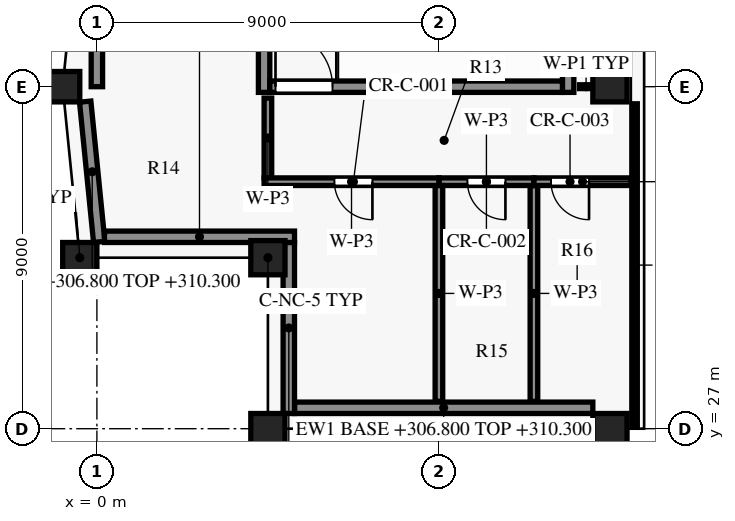
"""IFC4 building model, lengths in metres.
Left out: names, types, materials, properties, quantities, classifications, styles, units other than length and angle.
Written with IfcOpenShell. Run it as: python <this file> out.ifc"""

import sys

from ifc_helpers import new_model, si_unit, direction, frame, frame_2d, origin, origin_2d, place, context, subcontext, project, spatial, rectangle, extrude, element, fill, save


model = new_model("IFC4")
c1 = context("Model", 3, precision=1e-05, world=origin(), true_north=direction((0.0, 1.0)))
c2 = subcontext(c1, "Body", "Model", "MODEL_VIEW")
j1 = project(units=[si_unit("LENGTHUNIT", "METRE"), si_unit("PLANEANGLEUNIT", "RADIAN")], contexts=[c1])
p1 = place(None, origin())
s1 = spatial("IfcSite", under=j1, at=p1, CompositionType="ELEMENT")
p2 = place(p1, origin())
s2 = spatial("IfcBuilding", under=s1, at=p2, CompositionType="ELEMENT")
p3 = place(p2, frame((0.0, 0.0, 306.8)))
s3 = spatial("IfcBuildingStorey", under=s2, at=p3, CompositionType="ELEMENT", Elevation=306.8)
for number, where, z_axis, x_axis in (
    (1, (4.5, 27.0, 0.0), (0.0, 0.0, 1.0), (1.0, 0.0, 0.0)),
    (2, (13.5, 27.0, 0.0), (0.0, 0.0, 1.0), (1.0, 0.0, 0.0)),
    (3, (13.5, 36.0, 0.0), (0.0, 0.0, 1.0), (1.0, 0.0, 0.0)),
    (4, (-0.9, 36.0, 0.0), (0.0, 0.0, 1.0), (0.0, -1.0, 0.0)),
    (5, (-0.45, 31.5, 0.0), (0.0, 0.0, 1.0), (0.1, -0.995, 0.0)),
):
    element("IfcColumn", number, at=place(p3, frame(where, z_axis=z_axis, x_axis=x_axis)), inside=s3, PredefinedType="COLUMN", context=c2, shape_type="SweptSolid", body=[
        extrude(rectangle(XDim=0.9, YDim=0.8, at=origin_2d()), origin(), (0.0, 0.0, 1.0), 4.0),
    ])
p4 = place(p3, frame((4.5, 31.5, 0.0), z_axis=(0.0, 0.0, 1.0), x_axis=(1.0, 0.0, 0.0)))
e6 = element("IfcColumn", 6, at=p4, inside=s3, PredefinedType="COLUMN", context=c2, shape_type="SweptSolid", body=[
    extrude(rectangle(XDim=0.9, YDim=0.9, at=origin_2d()), origin(), (0.0, 0.0, 1.0), 4.0),
])
p5 = place(p3, frame((13.05, 27.55, 0.0), z_axis=(0.0, 0.0, 1.0), x_axis=(-1.0, 0.0, 0.0)))
e7 = element("IfcWall", 7, at=p5, inside=s3, PredefinedType="SOLIDWALL", context=c2, shape_type="SweptSolid", body=[
    extrude(rectangle(XDim=7.85, YDim=0.3, at=frame_2d((3.925, 0.0))), origin(), (0.0, 0.0, 1.0), 3.5),
])
p6 = place(p3, frame((0.061, 31.915, 0.0), z_axis=(0.0, 0.0, 1.0), x_axis=(-0.099549320092, 0.995032629048, 0.0)))
e8 = element("IfcWall", 8, at=p6, inside=s3, PredefinedType="SOLIDWALL", context=c2, shape_type="SweptSolid", body=[
    extrude(rectangle(XDim=3.71, YDim=0.3, at=frame_2d((1.855, 0.0))), origin(), (0.0, 0.0, 1.0), 3.5),
])
p7 = place(p3, frame((5.2, 32.05, 0.0), z_axis=(0.0, 0.0, 1.0), x_axis=(-1.0, 0.0, 0.0)))
e9 = element("IfcWall", 9, at=p7, inside=s3, PredefinedType="SOLIDWALL", context=c2, shape_type="SweptSolid", body=[
    extrude(rectangle(XDim=5.0, YDim=0.3, at=frame_2d((2.5, 0.0))), origin(), (0.0, 0.0, 1.0), 3.5),
])
p8 = place(p3, frame((5.05, 27.4, 0.0), z_axis=(0.0, 0.0, 1.0), x_axis=(0.0, 1.0, 0.0)))
e10 = element("IfcWall", 10, at=p8, inside=s3, PredefinedType="SOLIDWALL", context=c2, shape_type="SweptSolid", body=[
    extrude(rectangle(XDim=4.502, YDim=0.3, at=frame_2d((2.251, 0.0))), origin(), (0.0, 0.0, 1.0), 3.5),
])
p9 = place(p3, frame((4.55, 36.0, 0.0), z_axis=(0.0, 0.0, 1.0), x_axis=(1.0, 0.0, 0.0)))
e11 = element("IfcWall", 11, at=p9, inside=s3, PredefinedType="SHEAR", context=c2, shape_type="SweptSolid", body=[
    extrude(rectangle(XDim=7.7, YDim=0.3, at=frame_2d((3.85, 0.0))), origin(), (0.0, 0.0, 1.0), 3.7),
])
p10 = place(p9, frame((0.15, 0.0, 0.0)))
e12 = element("IfcOpeningElement", 12, at=p10, cuts=e11, PredefinedType="OPENING", context=c2, shape_type="SweptSolid", body=[
    extrude(rectangle(XDim=1.5, YDim=2.2, at=frame_2d((0.75, 1.1))), frame((0.0, 0.16, 0.0), z_axis=(0.0, -1.0, 0.0), x_axis=(1.0, 0.0, 0.0)), (0.0, 0.0, 1.0), 0.32),
])
p11 = place(p3, frame((0.0, 36.0, 0.0), z_axis=(0.0, 0.0, 1.0), x_axis=(0.0, 1.0, 0.0)))
e13 = element("IfcWall", 13, at=p11, inside=s3, PredefinedType="SHEAR", context=c2, shape_type="SweptSolid", body=[
    extrude(rectangle(XDim=7.275, YDim=0.3, at=frame_2d((3.637, 0.0))), origin(), (0.0, 0.0, 1.0), 3.7),
])
p12 = place(p3, frame((4.4, 35.85, 0.0), z_axis=(0.0, 0.0, 1.0), x_axis=(0.0, 1.0, 0.0)))
e14 = element("IfcWall", 14, at=p12, inside=s3, PredefinedType="SHEAR", context=c2, shape_type="SweptSolid", body=[
    extrude(rectangle(XDim=3.75, YDim=0.3, at=frame_2d((1.875, 0.0))), origin(), (0.0, 0.0, 1.0), 3.7),
])
p13 = place(p3, frame((12.4, 35.85, 0.0), z_axis=(0.0, 0.0, 1.0), x_axis=(0.0, 1.0, 0.0)))
e15 = element("IfcWall", 15, at=p13, inside=s3, PredefinedType="SHEAR", context=c2, shape_type="SweptSolid", body=[
    extrude(rectangle(XDim=3.9, YDim=0.3, at=frame_2d((1.95, 0.0))), origin(), (0.0, 0.0, 1.0), 3.7),
])
for number, where, z_axis, x_axis in (
    (16, (9.0, 33.4, 0.0), (0.0, 0.0, 1.0), (0.0, -1.0, 0.0)),
    (17, (11.5, 33.4, 0.0), (0.0, 0.0, 1.0), (0.0, -1.0, 0.0)),
):
    element("IfcWall", number, at=place(p3, frame(where, z_axis=z_axis, x_axis=x_axis)), inside=s3, PredefinedType="PARTITIONING", context=c2, shape_type="SweptSolid", body=[
        extrude(rectangle(XDim=5.68, YDim=0.2, at=frame_2d((2.84, 0.0))), origin(), (0.0, 0.0, 1.0), 3.68),
    ])
p14 = place(p3, frame((9.0, 33.5, 0.0), z_axis=(0.0, 0.0, 1.0), x_axis=(-1.0, 0.0, 0.0)))
e18 = element("IfcWall", 18, at=p14, inside=s3, PredefinedType="PARTITIONING", context=c2, shape_type="SweptSolid", body=[
    extrude(rectangle(XDim=4.6, YDim=0.2, at=frame_2d((2.3, 0.0))), origin(), (0.0, 0.0, 1.0), 3.68),
])
p15 = place(p14, frame((1.75, 0.0, 0.0)))
e19 = element("IfcOpeningElement", 19, at=p15, cuts=e18, PredefinedType="OPENING", context=c2, shape_type="SweptSolid", body=[
    extrude(rectangle(XDim=1.0, YDim=2.1, at=frame_2d((0.5, 1.05))), frame((0.0, 0.11, 0.0), z_axis=(0.0, -1.0, 0.0), x_axis=(1.0, 0.0, 0.0)), (0.0, 0.0, 1.0), 0.22),
])
p16 = place(p3, frame((11.5, 33.5, 0.0), z_axis=(0.0, 0.0, 1.0), x_axis=(-1.0, 0.0, 0.0)))
e20 = element("IfcWall", 20, at=p16, inside=s3, PredefinedType="PARTITIONING", context=c2, shape_type="SweptSolid", body=[
    extrude(rectangle(XDim=2.5, YDim=0.2, at=frame_2d((1.25, 0.0))), origin(), (0.0, 0.0, 1.0), 3.68),
])
p17 = place(p16, frame((0.75, 0.0, 0.0)))
e21 = element("IfcOpeningElement", 21, at=p17, cuts=e20, PredefinedType="OPENING", context=c2, shape_type="SweptSolid", body=[
    extrude(rectangle(XDim=1.0, YDim=2.1, at=frame_2d((0.5, 1.05))), frame((0.0, 0.11, 0.0), z_axis=(0.0, -1.0, 0.0), x_axis=(1.0, 0.0, 0.0)), (0.0, 0.0, 1.0), 0.22),
])
p18 = place(p3, frame((14.06, 33.5, 0.0), z_axis=(0.0, 0.0, 1.0), x_axis=(-1.0, 0.0, 0.0)))
e22 = element("IfcWall", 22, at=p18, inside=s3, PredefinedType="PARTITIONING", context=c2, shape_type="SweptSolid", body=[
    extrude(rectangle(XDim=2.56, YDim=0.2, at=frame_2d((1.28, 0.0))), origin(), (0.0, 0.0, 1.0), 3.33),
])
p19 = place(p18, frame((1.11, 0.0, 0.0)))
e23 = element("IfcOpeningElement", 23, at=p19, cuts=e22, PredefinedType="OPENING", context=c2, shape_type="SweptSolid", body=[
    extrude(rectangle(XDim=1.0, YDim=2.1, at=frame_2d((0.5, 1.05))), frame((0.0, 0.11, 0.0), z_axis=(0.0, -1.0, 0.0), x_axis=(1.0, 0.0, 0.0)), (0.0, 0.0, 1.0), 0.22),
])
p20 = place(p3, frame((4.5, 33.6, 0.0), z_axis=(0.0, 0.0, 1.0), x_axis=(0.0, 1.0, 0.0)))
e24 = element("IfcWall", 24, at=p20, inside=s3, PredefinedType="PARTITIONING", context=c2, shape_type="SweptSolid", body=[
    extrude(rectangle(XDim=2.1, YDim=0.2, at=frame_2d((1.05, 0.0))), origin(), (0.0, 0.0, 1.0), 3.68),
])
p21 = place(p3, frame((12.7, 36.0, 0.0), z_axis=(0.0, 0.0, 1.0), x_axis=(1.0, 0.0, 0.0)))
e25 = element("IfcWall", 25, at=p21, inside=s3, PredefinedType="PARTITIONING", context=c2, shape_type="SweptSolid", body=[
    extrude(rectangle(XDim=0.345, YDim=0.1, at=frame_2d((0.172, 0.0))), origin(), (0.0, 0.0, 1.0), 3.68),
])
p22 = place(p10, origin())
e26 = element("IfcDoor", 26, at=p22, inside=s3, OperationType="SINGLE_SWING_RIGHT", PredefinedType="DOOR", context=c2, shape_type="SweptSolid", body=[
    extrude(rectangle(XDim=1.5, YDim=2.2, at=frame_2d((0.75, 1.1))), frame((0.0, 0.025, 0.0), z_axis=(0.0, -1.0, 0.0), x_axis=(1.0, 0.0, 0.0)), (0.0, 0.0, 1.0), 0.05),
])
fill(e12, e26)
p23 = place(p15, origin())
e27 = element("IfcDoor", 27, at=p23, inside=s3, OperationType="SINGLE_SWING_RIGHT", PredefinedType="DOOR", context=c2, shape_type="SweptSolid", body=[
    extrude(rectangle(XDim=1.0, YDim=2.1, at=frame_2d((0.5, 1.05))), frame((0.0, 0.025, 0.0), z_axis=(0.0, -1.0, 0.0), x_axis=(1.0, 0.0, 0.0)), (0.0, 0.0, 1.0), 0.05),
])
fill(e19, e27)
p24 = place(p17, origin())
e28 = element("IfcDoor", 28, at=p24, inside=s3, OperationType="SINGLE_SWING_RIGHT", PredefinedType="DOOR", context=c2, shape_type="SweptSolid", body=[
    extrude(rectangle(XDim=1.0, YDim=2.1, at=frame_2d((0.5, 1.05))), frame((0.0, 0.025, 0.0), z_axis=(0.0, -1.0, 0.0), x_axis=(1.0, 0.0, 0.0)), (0.0, 0.0, 1.0), 0.05),
])
fill(e21, e28)
p25 = place(p19, origin())
e29 = element("IfcDoor", 29, at=p25, inside=s3, OperationType="SINGLE_SWING_LEFT", PredefinedType="DOOR", context=c2, shape_type="SweptSolid", body=[
    extrude(rectangle(XDim=1.0, YDim=2.1, at=frame_2d((0.5, 1.05))), frame((0.0, 0.025, 0.0), z_axis=(0.0, -1.0, 0.0), x_axis=(1.0, 0.0, 0.0)), (0.0, 0.0, 1.0), 0.05),
])
fill(e23, e29)
save(model, sys.argv[1])
